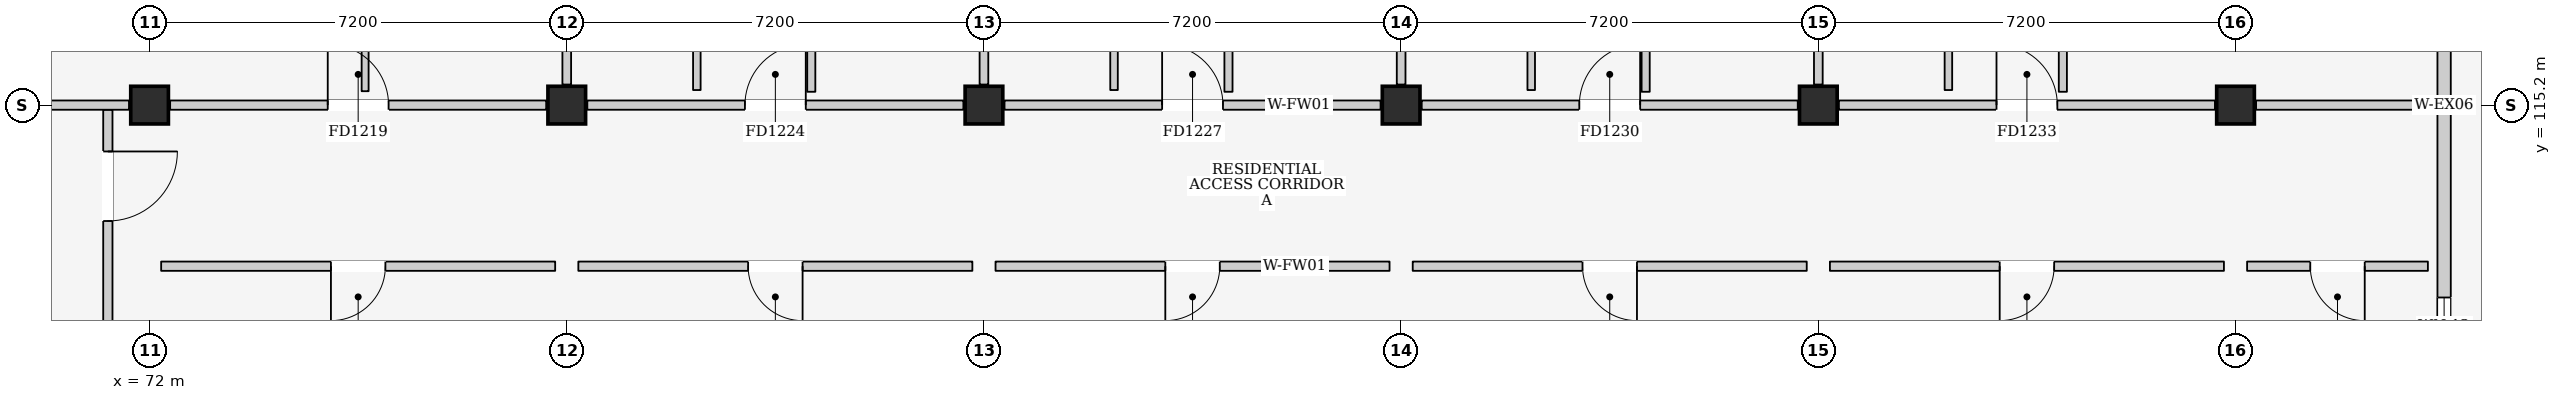
"""IFC4 building model, lengths in metres.
Left out: names, types, materials, properties, quantities, classifications, styles, units other than length and angle.
Written with IfcOpenShell. Run it as: python <this file> out.ifc"""

import sys

from ifc_helpers import new_model, si_unit, direction, frame, frame_2d, origin, origin_2d, place, context, subcontext, project, spatial, rectangle, extrude, element, fill, save


model = new_model("IFC4")
c1 = context("Model", 3, precision=1e-05, world=origin(), true_north=direction((0.0, 1.0)))
c2 = subcontext(c1, "Body", "Model", "MODEL_VIEW")
j1 = project(units=[si_unit("LENGTHUNIT", "METRE"), si_unit("PLANEANGLEUNIT", "RADIAN")], contexts=[c1])
p1 = place(None, origin())
s1 = spatial("IfcSite", under=j1, at=p1, CompositionType="ELEMENT")
p2 = place(p1, origin())
s2 = spatial("IfcBuilding", under=s1, at=p2, CompositionType="ELEMENT")
p3 = place(p2, frame((0.0, 0.0, 18.6)))
s3 = spatial("IfcBuildingStorey", under=s2, at=p3, CompositionType="ELEMENT", Elevation=18.6)
for number, where, z_axis, x_axis in (
    (1, (72.0, 115.2, 0.0), (0.0, 0.0, 1.0), (1.0, 0.0, 0.0)),
    (2, (79.2, 115.2, 0.0), (0.0, 0.0, 1.0), (1.0, 0.0, 0.0)),
    (3, (86.4, 115.2, 0.0), (0.0, 0.0, 1.0), (1.0, 0.0, 0.0)),
    (4, (93.6, 115.2, 0.0), (0.0, 0.0, 1.0), (1.0, 0.0, 0.0)),
    (5, (100.8, 115.2, 0.0), (0.0, 0.0, 1.0), (1.0, 0.0, 0.0)),
    (6, (108.0, 115.2, 0.0), (0.0, 0.0, 1.0), (1.0, 0.0, 0.0)),
):
    element("IfcColumn", number, at=place(p3, frame(where, z_axis=z_axis, x_axis=x_axis)), inside=s3, PredefinedType="COLUMN", context=c2, shape_type="SweptSolid", body=[
        extrude(rectangle(XDim=0.65, YDim=0.65, at=origin_2d()), origin(), (0.0, 0.0, 1.0), 3.3),
    ])
p4 = place(p3, frame((111.6, 108.13, 0.0), z_axis=(0.0, 0.0, 1.0), x_axis=(0.0, 1.0, 0.0)))
e7 = element("IfcWall", 7, at=p4, inside=s3, PredefinedType="ELEMENTEDWALL", context=c2, shape_type="SweptSolid", body=[
    extrude(rectangle(XDim=7.07, YDim=0.23, at=frame_2d((3.535, 0.0))), origin(), (0.0, 0.0, 1.0), 2.495),
])
p5 = place(p4, frame((2.75, 0.0, 1.1)))
e8 = element("IfcOpeningElement", 8, at=p5, cuts=e7, PredefinedType="OPENING", context=c2, shape_type="SweptSolid", body=[
    extrude(rectangle(XDim=1.0, YDim=0.9, at=frame_2d((0.5, 0.45))), frame((0.0, 0.13, 0.0), z_axis=(0.0, -1.0, 0.0), x_axis=(1.0, 0.0, 0.0)), (0.0, 0.0, 1.0), 0.26),
])
p6 = place(p3, frame((111.6, 115.2, 0.0), z_axis=(0.0, 0.0, 1.0), x_axis=(0.0, 1.0, 0.0)))
e9 = element("IfcWall", 9, at=p6, inside=s3, PredefinedType="ELEMENTEDWALL", context=c2, shape_type="SweptSolid", body=[
    extrude(rectangle(XDim=7.07, YDim=0.23, at=frame_2d((3.535, 0.0))), origin(), (0.0, 0.0, 1.0), 2.495),
])
p7 = place(p6, frame((3.6, 0.0, 0.0)))
e10 = element("IfcOpeningElement", 10, at=p7, cuts=e9, PredefinedType="OPENING", context=c2, shape_type="SweptSolid", body=[
    extrude(rectangle(XDim=1.08, YDim=2.12, at=frame_2d((0.54, 1.06))), frame((0.0, 0.13, 0.0), z_axis=(0.0, -1.0, 0.0), x_axis=(1.0, 0.0, 0.0)), (0.0, 0.0, 1.0), 0.26),
])
p8 = place(p3, frame((71.28, 110.8, 0.0), z_axis=(0.0, 0.0, 1.0), x_axis=(0.0, 1.0, 0.0)))
e11 = element("IfcWall", 11, at=p8, inside=s3, PredefinedType="PARTITIONING", context=c2, shape_type="SweptSolid", body=[
    extrude(rectangle(XDim=4.32, YDim=0.16, at=frame_2d((2.16, 0.0))), origin(), (0.0, 0.0, 1.0), 3.06),
])
p9 = place(p8, frame((2.4, 0.0, 0.0)))
e12 = element("IfcOpeningElement", 12, at=p9, cuts=e11, PredefinedType="OPENING", context=c2, shape_type="SweptSolid", body=[
    extrude(rectangle(XDim=1.2, YDim=2.2, at=frame_2d((0.6, 1.1))), frame((0.0, 0.095, 0.0), z_axis=(0.0, -1.0, 0.0), x_axis=(1.0, 0.0, 0.0)), (0.0, 0.0, 1.0), 0.19),
])
p10 = place(p3, frame((65.155, 115.2, 0.0), z_axis=(0.0, 0.0, 1.0), x_axis=(1.0, 0.0, 0.0)))
e13 = element("IfcWall", 13, at=p10, inside=s3, PredefinedType="PARTITIONING", context=c2, shape_type="SweptSolid", body=[
    extrude(rectangle(XDim=6.49, YDim=0.16, at=frame_2d((3.245, 0.0))), origin(), (0.0, 0.0, 1.0), 2.395),
])
p11 = place(p3, frame((72.355, 115.2, 0.0), z_axis=(0.0, 0.0, 1.0), x_axis=(1.0, 0.0, 0.0)))
e14 = element("IfcWall", 14, at=p11, inside=s3, PredefinedType="PARTITIONING", context=c2, shape_type="SweptSolid", body=[
    extrude(rectangle(XDim=6.49, YDim=0.16, at=frame_2d((3.245, 0.0))), origin(), (0.0, 0.0, 1.0), 2.395),
])
p12 = place(p11, frame((2.72, 0.0, 0.0)))
e15 = element("IfcOpeningElement", 15, at=p12, cuts=e14, PredefinedType="OPENING", context=c2, shape_type="SweptSolid", body=[
    extrude(rectangle(XDim=1.05, YDim=2.15, at=frame_2d((0.525, 1.075))), frame((0.0, 0.095, 0.0), z_axis=(0.0, -1.0, 0.0), x_axis=(1.0, 0.0, 0.0)), (0.0, 0.0, 1.0), 0.19),
])
p13 = place(p3, frame((79.2, 115.555, 0.0), z_axis=(0.0, 0.0, 1.0), x_axis=(0.0, 1.0, 0.0)))
e16 = element("IfcWall", 16, at=p13, inside=s3, PredefinedType="PARTITIONING", context=c2, shape_type="SweptSolid", body=[
    extrude(rectangle(XDim=6.49, YDim=0.15, at=frame_2d((3.245, 0.0))), origin(), (0.0, 0.0, 1.0), 2.545),
])
p14 = place(p3, frame((75.72, 115.44, 0.0), z_axis=(0.0, 0.0, 1.0), x_axis=(0.0, 1.0, 0.0)))
e17 = element("IfcWall", 17, at=p14, inside=s3, PredefinedType="PARTITIONING", context=c2, shape_type="SweptSolid", body=[
    extrude(rectangle(XDim=3.04, YDim=0.12, at=frame_2d((1.52, 0.0))), origin(), (0.0, 0.0, 1.0), 3.06),
])
p15 = place(p14, frame((1.04, 0.0, 0.0)))
e18 = element("IfcOpeningElement", 18, at=p15, cuts=e17, PredefinedType="OPENING", context=c2, shape_type="SweptSolid", body=[
    extrude(rectangle(XDim=0.96, YDim=2.15, at=frame_2d((0.48, 1.075))), frame((0.0, 0.075, 0.0), z_axis=(0.0, -1.0, 0.0), x_axis=(1.0, 0.0, 0.0)), (0.0, 0.0, 1.0), 0.15),
])
p16 = place(p3, frame((79.555, 115.2, 0.0), z_axis=(0.0, 0.0, 1.0), x_axis=(1.0, 0.0, 0.0)))
e19 = element("IfcWall", 19, at=p16, inside=s3, PredefinedType="PARTITIONING", context=c2, shape_type="SweptSolid", body=[
    extrude(rectangle(XDim=6.49, YDim=0.16, at=frame_2d((3.245, 0.0))), origin(), (0.0, 0.0, 1.0), 2.395),
])
p17 = place(p16, frame((2.72, 0.0, 0.0)))
e20 = element("IfcOpeningElement", 20, at=p17, cuts=e19, PredefinedType="OPENING", context=c2, shape_type="SweptSolid", body=[
    extrude(rectangle(XDim=1.05, YDim=2.15, at=frame_2d((0.525, 1.075))), frame((0.0, 0.095, 0.0), z_axis=(0.0, -1.0, 0.0), x_axis=(1.0, 0.0, 0.0)), (0.0, 0.0, 1.0), 0.19),
])
p18 = place(p3, frame((86.4, 115.555, 0.0), z_axis=(0.0, 0.0, 1.0), x_axis=(0.0, 1.0, 0.0)))
e21 = element("IfcWall", 21, at=p18, inside=s3, PredefinedType="PARTITIONING", context=c2, shape_type="SweptSolid", body=[
    extrude(rectangle(XDim=6.49, YDim=0.15, at=frame_2d((3.245, 0.0))), origin(), (0.0, 0.0, 1.0), 2.545),
])
p19 = place(p3, frame((81.445, 115.46, 0.0), z_axis=(0.0, 0.0, 1.0), x_axis=(0.0, 1.0, 0.0)))
e22 = element("IfcWall", 22, at=p19, inside=s3, PredefinedType="PARTITIONING", context=c2, shape_type="SweptSolid", body=[
    extrude(rectangle(XDim=2.13, YDim=0.13, at=frame_2d((1.065, 0.0))), origin(), (0.0, 0.0, 1.0), 3.06),
])
p20 = place(p3, frame((83.42, 115.43, 0.0), z_axis=(0.0, 0.0, 1.0), x_axis=(0.0, 1.0, 0.0)))
e23 = element("IfcWall", 23, at=p20, inside=s3, PredefinedType="PARTITIONING", context=c2, shape_type="SweptSolid", body=[
    extrude(rectangle(XDim=2.15, YDim=0.14, at=frame_2d((1.075, 0.0))), origin(), (0.0, 0.0, 1.0), 3.06),
])
p21 = place(p3, frame((86.755, 115.2, 0.0), z_axis=(0.0, 0.0, 1.0), x_axis=(1.0, 0.0, 0.0)))
e24 = element("IfcWall", 24, at=p21, inside=s3, PredefinedType="PARTITIONING", context=c2, shape_type="SweptSolid", body=[
    extrude(rectangle(XDim=6.49, YDim=0.16, at=frame_2d((3.245, 0.0))), origin(), (0.0, 0.0, 1.0), 2.395),
])
p22 = place(p21, frame((2.72, 0.0, 0.0)))
e25 = element("IfcOpeningElement", 25, at=p22, cuts=e24, PredefinedType="OPENING", context=c2, shape_type="SweptSolid", body=[
    extrude(rectangle(XDim=1.05, YDim=2.15, at=frame_2d((0.525, 1.075))), frame((0.0, 0.095, 0.0), z_axis=(0.0, -1.0, 0.0), x_axis=(1.0, 0.0, 0.0)), (0.0, 0.0, 1.0), 0.19),
])
p23 = place(p3, frame((93.6, 115.555, 0.0), z_axis=(0.0, 0.0, 1.0), x_axis=(0.0, 1.0, 0.0)))
e26 = element("IfcWall", 26, at=p23, inside=s3, PredefinedType="PARTITIONING", context=c2, shape_type="SweptSolid", body=[
    extrude(rectangle(XDim=6.49, YDim=0.15, at=frame_2d((3.245, 0.0))), origin(), (0.0, 0.0, 1.0), 2.545),
])
p24 = place(p3, frame((88.645, 115.46, 0.0), z_axis=(0.0, 0.0, 1.0), x_axis=(0.0, 1.0, 0.0)))
e27 = element("IfcWall", 27, at=p24, inside=s3, PredefinedType="PARTITIONING", context=c2, shape_type="SweptSolid", body=[
    extrude(rectangle(XDim=2.13, YDim=0.13, at=frame_2d((1.065, 0.0))), origin(), (0.0, 0.0, 1.0), 3.06),
])
p25 = place(p3, frame((90.62, 115.43, 0.0), z_axis=(0.0, 0.0, 1.0), x_axis=(0.0, 1.0, 0.0)))
e28 = element("IfcWall", 28, at=p25, inside=s3, PredefinedType="PARTITIONING", context=c2, shape_type="SweptSolid", body=[
    extrude(rectangle(XDim=2.15, YDim=0.14, at=frame_2d((1.075, 0.0))), origin(), (0.0, 0.0, 1.0), 3.06),
])
p26 = place(p3, frame((93.955, 115.2, 0.0), z_axis=(0.0, 0.0, 1.0), x_axis=(1.0, 0.0, 0.0)))
e29 = element("IfcWall", 29, at=p26, inside=s3, PredefinedType="PARTITIONING", context=c2, shape_type="SweptSolid", body=[
    extrude(rectangle(XDim=6.49, YDim=0.16, at=frame_2d((3.245, 0.0))), origin(), (0.0, 0.0, 1.0), 2.395),
])
p27 = place(p26, frame((2.72, 0.0, 0.0)))
e30 = element("IfcOpeningElement", 30, at=p27, cuts=e29, PredefinedType="OPENING", context=c2, shape_type="SweptSolid", body=[
    extrude(rectangle(XDim=1.05, YDim=2.15, at=frame_2d((0.525, 1.075))), frame((0.0, 0.095, 0.0), z_axis=(0.0, -1.0, 0.0), x_axis=(1.0, 0.0, 0.0)), (0.0, 0.0, 1.0), 0.19),
])
p28 = place(p3, frame((100.8, 115.555, 0.0), z_axis=(0.0, 0.0, 1.0), x_axis=(0.0, 1.0, 0.0)))
e31 = element("IfcWall", 31, at=p28, inside=s3, PredefinedType="PARTITIONING", context=c2, shape_type="SweptSolid", body=[
    extrude(rectangle(XDim=6.49, YDim=0.15, at=frame_2d((3.245, 0.0))), origin(), (0.0, 0.0, 1.0), 2.545),
])
p29 = place(p3, frame((95.845, 115.46, 0.0), z_axis=(0.0, 0.0, 1.0), x_axis=(0.0, 1.0, 0.0)))
e32 = element("IfcWall", 32, at=p29, inside=s3, PredefinedType="PARTITIONING", context=c2, shape_type="SweptSolid", body=[
    extrude(rectangle(XDim=2.13, YDim=0.13, at=frame_2d((1.065, 0.0))), origin(), (0.0, 0.0, 1.0), 3.06),
])
p30 = place(p3, frame((97.82, 115.43, 0.0), z_axis=(0.0, 0.0, 1.0), x_axis=(0.0, 1.0, 0.0)))
e33 = element("IfcWall", 33, at=p30, inside=s3, PredefinedType="PARTITIONING", context=c2, shape_type="SweptSolid", body=[
    extrude(rectangle(XDim=2.15, YDim=0.14, at=frame_2d((1.075, 0.0))), origin(), (0.0, 0.0, 1.0), 3.06),
])
p31 = place(p3, frame((101.155, 115.2, 0.0), z_axis=(0.0, 0.0, 1.0), x_axis=(1.0, 0.0, 0.0)))
e34 = element("IfcWall", 34, at=p31, inside=s3, PredefinedType="PARTITIONING", context=c2, shape_type="SweptSolid", body=[
    extrude(rectangle(XDim=6.49, YDim=0.16, at=frame_2d((3.245, 0.0))), origin(), (0.0, 0.0, 1.0), 2.395),
])
p32 = place(p31, frame((2.72, 0.0, 0.0)))
e35 = element("IfcOpeningElement", 35, at=p32, cuts=e34, PredefinedType="OPENING", context=c2, shape_type="SweptSolid", body=[
    extrude(rectangle(XDim=1.05, YDim=2.15, at=frame_2d((0.525, 1.075))), frame((0.0, 0.095, 0.0), z_axis=(0.0, -1.0, 0.0), x_axis=(1.0, 0.0, 0.0)), (0.0, 0.0, 1.0), 0.19),
])
p33 = place(p3, frame((108.355, 115.2, 0.0), z_axis=(0.0, 0.0, 1.0), x_axis=(1.0, 0.0, 0.0)))
e36 = element("IfcWall", 36, at=p33, inside=s3, PredefinedType="PARTITIONING", context=c2, shape_type="SweptSolid", body=[
    extrude(rectangle(XDim=2.965, YDim=0.16, at=frame_2d((1.482, 0.0))), origin(), (0.0, 0.0, 1.0), 2.395),
])
p34 = place(p3, frame((103.045, 115.46, 0.0), z_axis=(0.0, 0.0, 1.0), x_axis=(0.0, 1.0, 0.0)))
e37 = element("IfcWall", 37, at=p34, inside=s3, PredefinedType="PARTITIONING", context=c2, shape_type="SweptSolid", body=[
    extrude(rectangle(XDim=2.13, YDim=0.13, at=frame_2d((1.065, 0.0))), origin(), (0.0, 0.0, 1.0), 3.06),
])
p35 = place(p3, frame((105.02, 115.43, 0.0), z_axis=(0.0, 0.0, 1.0), x_axis=(0.0, 1.0, 0.0)))
e38 = element("IfcWall", 38, at=p35, inside=s3, PredefinedType="PARTITIONING", context=c2, shape_type="SweptSolid", body=[
    extrude(rectangle(XDim=2.15, YDim=0.14, at=frame_2d((1.075, 0.0))), origin(), (0.0, 0.0, 1.0), 3.06),
])
p36 = place(p3, frame((72.2, 112.42, 0.0), z_axis=(0.0, 0.0, 1.0), x_axis=(1.0, 0.0, 0.0)))
e39 = element("IfcWall", 39, at=p36, inside=s3, PredefinedType="PARTITIONING", context=c2, shape_type="SweptSolid", body=[
    extrude(rectangle(XDim=6.8, YDim=0.16, at=frame_2d((3.4, 0.0))), origin(), (0.0, 0.0, 1.0), 3.06),
])
p37 = place(p36, frame((2.93, 0.0, 0.0)))
e40 = element("IfcOpeningElement", 40, at=p37, cuts=e39, PredefinedType="OPENING", context=c2, shape_type="SweptSolid", body=[
    extrude(rectangle(XDim=0.94, YDim=2.12, at=frame_2d((0.47, 1.06))), frame((0.0, 0.095, 0.0), z_axis=(0.0, -1.0, 0.0), x_axis=(1.0, 0.0, 0.0)), (0.0, 0.0, 1.0), 0.19),
])
p38 = place(p3, frame((79.4, 112.42, 0.0), z_axis=(0.0, 0.0, 1.0), x_axis=(1.0, 0.0, 0.0)))
e41 = element("IfcWall", 41, at=p38, inside=s3, PredefinedType="PARTITIONING", context=c2, shape_type="SweptSolid", body=[
    extrude(rectangle(XDim=6.8, YDim=0.16, at=frame_2d((3.4, 0.0))), origin(), (0.0, 0.0, 1.0), 3.06),
])
p39 = place(p38, frame((2.93, 0.0, 0.0)))
e42 = element("IfcOpeningElement", 42, at=p39, cuts=e41, PredefinedType="OPENING", context=c2, shape_type="SweptSolid", body=[
    extrude(rectangle(XDim=0.94, YDim=2.12, at=frame_2d((0.47, 1.06))), frame((0.0, 0.095, 0.0), z_axis=(0.0, -1.0, 0.0), x_axis=(1.0, 0.0, 0.0)), (0.0, 0.0, 1.0), 0.19),
])
p40 = place(p3, frame((86.6, 112.42, 0.0), z_axis=(0.0, 0.0, 1.0), x_axis=(1.0, 0.0, 0.0)))
e43 = element("IfcWall", 43, at=p40, inside=s3, PredefinedType="PARTITIONING", context=c2, shape_type="SweptSolid", body=[
    extrude(rectangle(XDim=6.8, YDim=0.16, at=frame_2d((3.4, 0.0))), origin(), (0.0, 0.0, 1.0), 3.06),
])
p41 = place(p40, frame((2.93, 0.0, 0.0)))
e44 = element("IfcOpeningElement", 44, at=p41, cuts=e43, PredefinedType="OPENING", context=c2, shape_type="SweptSolid", body=[
    extrude(rectangle(XDim=0.94, YDim=2.12, at=frame_2d((0.47, 1.06))), frame((0.0, 0.095, 0.0), z_axis=(0.0, -1.0, 0.0), x_axis=(1.0, 0.0, 0.0)), (0.0, 0.0, 1.0), 0.19),
])
p42 = place(p3, frame((93.8, 112.42, 0.0), z_axis=(0.0, 0.0, 1.0), x_axis=(1.0, 0.0, 0.0)))
e45 = element("IfcWall", 45, at=p42, inside=s3, PredefinedType="PARTITIONING", context=c2, shape_type="SweptSolid", body=[
    extrude(rectangle(XDim=6.8, YDim=0.16, at=frame_2d((3.4, 0.0))), origin(), (0.0, 0.0, 1.0), 3.06),
])
p43 = place(p42, frame((2.93, 0.0, 0.0)))
e46 = element("IfcOpeningElement", 46, at=p43, cuts=e45, PredefinedType="OPENING", context=c2, shape_type="SweptSolid", body=[
    extrude(rectangle(XDim=0.94, YDim=2.12, at=frame_2d((0.47, 1.06))), frame((0.0, 0.095, 0.0), z_axis=(0.0, -1.0, 0.0), x_axis=(1.0, 0.0, 0.0)), (0.0, 0.0, 1.0), 0.19),
])
p44 = place(p3, frame((101.0, 112.42, 0.0), z_axis=(0.0, 0.0, 1.0), x_axis=(1.0, 0.0, 0.0)))
e47 = element("IfcWall", 47, at=p44, inside=s3, PredefinedType="PARTITIONING", context=c2, shape_type="SweptSolid", body=[
    extrude(rectangle(XDim=6.8, YDim=0.16, at=frame_2d((3.4, 0.0))), origin(), (0.0, 0.0, 1.0), 3.06),
])
p45 = place(p44, frame((2.93, 0.0, 0.0)))
e48 = element("IfcOpeningElement", 48, at=p45, cuts=e47, PredefinedType="OPENING", context=c2, shape_type="SweptSolid", body=[
    extrude(rectangle(XDim=0.94, YDim=2.12, at=frame_2d((0.47, 1.06))), frame((0.0, 0.095, 0.0), z_axis=(0.0, -1.0, 0.0), x_axis=(1.0, 0.0, 0.0)), (0.0, 0.0, 1.0), 0.19),
])
p46 = place(p3, frame((108.2, 112.42, 0.0), z_axis=(0.0, 0.0, 1.0), x_axis=(1.0, 0.0, 0.0)))
e49 = element("IfcWall", 49, at=p46, inside=s3, PredefinedType="PARTITIONING", context=c2, shape_type="SweptSolid", body=[
    extrude(rectangle(XDim=3.12, YDim=0.16, at=frame_2d((1.56, 0.0))), origin(), (0.0, 0.0, 1.0), 3.06),
])
p47 = place(p46, frame((1.09, 0.0, 0.0)))
e50 = element("IfcOpeningElement", 50, at=p47, cuts=e49, PredefinedType="OPENING", context=c2, shape_type="SweptSolid", body=[
    extrude(rectangle(XDim=0.94, YDim=2.12, at=frame_2d((0.47, 1.06))), frame((0.0, 0.095, 0.0), z_axis=(0.0, -1.0, 0.0), x_axis=(1.0, 0.0, 0.0)), (0.0, 0.0, 1.0), 0.19),
])
p48 = place(p5, origin())
e51 = element("IfcWindow", 51, at=p48, inside=s3, PartitioningType="SINGLE_PANEL", PredefinedType="WINDOW", context=c2, shape_type="SweptSolid", body=[
    extrude(rectangle(XDim=1.0, YDim=0.9, at=frame_2d((0.5, 0.45))), frame((0.0, 0.03, 0.0), z_axis=(0.0, -1.0, 0.0), x_axis=(1.0, 0.0, 0.0)), (0.0, 0.0, 1.0), 0.06),
])
fill(e8, e51)
p49 = place(p9, frame((1.2, 0.0, 0.0), z_axis=(0.0, 0.0, 1.0), x_axis=(-1.0, 0.0, 0.0)))
e52 = element("IfcDoor", 52, at=p49, inside=s3, OperationType="SINGLE_SWING_LEFT", PredefinedType="DOOR", context=c2, shape_type="SweptSolid", body=[
    extrude(rectangle(XDim=1.2, YDim=2.2, at=frame_2d((0.6, 1.1))), frame((0.0, 0.025, 0.0), z_axis=(0.0, -1.0, 0.0), x_axis=(1.0, 0.0, 0.0)), (0.0, 0.0, 1.0), 0.05),
])
fill(e12, e52)
p50 = place(p12, origin())
e53 = element("IfcDoor", 53, at=p50, inside=s3, OperationType="SINGLE_SWING_LEFT", PredefinedType="DOOR", context=c2, shape_type="SweptSolid", body=[
    extrude(rectangle(XDim=1.05, YDim=2.15, at=frame_2d((0.525, 1.075))), frame((0.0, 0.025, 0.0), z_axis=(0.0, -1.0, 0.0), x_axis=(1.0, 0.0, 0.0)), (0.0, 0.0, 1.0), 0.05),
])
fill(e15, e53)
p51 = place(p17, origin())
e54 = element("IfcDoor", 54, at=p51, inside=s3, OperationType="SINGLE_SWING_RIGHT", PredefinedType="DOOR", context=c2, shape_type="SweptSolid", body=[
    extrude(rectangle(XDim=1.05, YDim=2.15, at=frame_2d((0.525, 1.075))), frame((0.0, 0.025, 0.0), z_axis=(0.0, -1.0, 0.0), x_axis=(1.0, 0.0, 0.0)), (0.0, 0.0, 1.0), 0.05),
])
fill(e20, e54)
p52 = place(p22, origin())
e55 = element("IfcDoor", 55, at=p52, inside=s3, OperationType="SINGLE_SWING_LEFT", PredefinedType="DOOR", context=c2, shape_type="SweptSolid", body=[
    extrude(rectangle(XDim=1.05, YDim=2.15, at=frame_2d((0.525, 1.075))), frame((0.0, 0.025, 0.0), z_axis=(0.0, -1.0, 0.0), x_axis=(1.0, 0.0, 0.0)), (0.0, 0.0, 1.0), 0.05),
])
fill(e25, e55)
p53 = place(p27, origin())
e56 = element("IfcDoor", 56, at=p53, inside=s3, OperationType="SINGLE_SWING_RIGHT", PredefinedType="DOOR", context=c2, shape_type="SweptSolid", body=[
    extrude(rectangle(XDim=1.05, YDim=2.15, at=frame_2d((0.525, 1.075))), frame((0.0, 0.025, 0.0), z_axis=(0.0, -1.0, 0.0), x_axis=(1.0, 0.0, 0.0)), (0.0, 0.0, 1.0), 0.05),
])
fill(e30, e56)
p54 = place(p32, origin())
e57 = element("IfcDoor", 57, at=p54, inside=s3, OperationType="SINGLE_SWING_LEFT", PredefinedType="DOOR", context=c2, shape_type="SweptSolid", body=[
    extrude(rectangle(XDim=1.05, YDim=2.15, at=frame_2d((0.525, 1.075))), frame((0.0, 0.025, 0.0), z_axis=(0.0, -1.0, 0.0), x_axis=(1.0, 0.0, 0.0)), (0.0, 0.0, 1.0), 0.05),
])
fill(e35, e57)
p55 = place(p37, frame((0.94, 0.0, 0.0), z_axis=(0.0, 0.0, 1.0), x_axis=(-1.0, 0.0, 0.0)))
e58 = element("IfcDoor", 58, at=p55, inside=s3, OperationType="SINGLE_SWING_RIGHT", PredefinedType="DOOR", context=c2, shape_type="SweptSolid", body=[
    extrude(rectangle(XDim=0.94, YDim=2.12, at=frame_2d((0.47, 1.06))), frame((0.0, 0.025, 0.0), z_axis=(0.0, -1.0, 0.0), x_axis=(1.0, 0.0, 0.0)), (0.0, 0.0, 1.0), 0.05),
])
fill(e40, e58)
p56 = place(p39, frame((0.94, 0.0, 0.0), z_axis=(0.0, 0.0, 1.0), x_axis=(-1.0, 0.0, 0.0)))
e59 = element("IfcDoor", 59, at=p56, inside=s3, OperationType="SINGLE_SWING_LEFT", PredefinedType="DOOR", context=c2, shape_type="SweptSolid", body=[
    extrude(rectangle(XDim=0.94, YDim=2.12, at=frame_2d((0.47, 1.06))), frame((0.0, 0.025, 0.0), z_axis=(0.0, -1.0, 0.0), x_axis=(1.0, 0.0, 0.0)), (0.0, 0.0, 1.0), 0.05),
])
fill(e42, e59)
p57 = place(p41, frame((0.94, 0.0, 0.0), z_axis=(0.0, 0.0, 1.0), x_axis=(-1.0, 0.0, 0.0)))
e60 = element("IfcDoor", 60, at=p57, inside=s3, OperationType="SINGLE_SWING_RIGHT", PredefinedType="DOOR", context=c2, shape_type="SweptSolid", body=[
    extrude(rectangle(XDim=0.94, YDim=2.12, at=frame_2d((0.47, 1.06))), frame((0.0, 0.025, 0.0), z_axis=(0.0, -1.0, 0.0), x_axis=(1.0, 0.0, 0.0)), (0.0, 0.0, 1.0), 0.05),
])
fill(e44, e60)
p58 = place(p43, frame((0.94, 0.0, 0.0), z_axis=(0.0, 0.0, 1.0), x_axis=(-1.0, 0.0, 0.0)))
e61 = element("IfcDoor", 61, at=p58, inside=s3, OperationType="SINGLE_SWING_LEFT", PredefinedType="DOOR", context=c2, shape_type="SweptSolid", body=[
    extrude(rectangle(XDim=0.94, YDim=2.12, at=frame_2d((0.47, 1.06))), frame((0.0, 0.025, 0.0), z_axis=(0.0, -1.0, 0.0), x_axis=(1.0, 0.0, 0.0)), (0.0, 0.0, 1.0), 0.05),
])
fill(e46, e61)
p59 = place(p45, frame((0.94, 0.0, 0.0), z_axis=(0.0, 0.0, 1.0), x_axis=(-1.0, 0.0, 0.0)))
e62 = element("IfcDoor", 62, at=p59, inside=s3, OperationType="SINGLE_SWING_RIGHT", PredefinedType="DOOR", context=c2, shape_type="SweptSolid", body=[
    extrude(rectangle(XDim=0.94, YDim=2.12, at=frame_2d((0.47, 1.06))), frame((0.0, 0.025, 0.0), z_axis=(0.0, -1.0, 0.0), x_axis=(1.0, 0.0, 0.0)), (0.0, 0.0, 1.0), 0.05),
])
fill(e48, e62)
p60 = place(p47, frame((0.94, 0.0, 0.0), z_axis=(0.0, 0.0, 1.0), x_axis=(-1.0, 0.0, 0.0)))
e63 = element("IfcDoor", 63, at=p60, inside=s3, OperationType="SINGLE_SWING_LEFT", PredefinedType="DOOR", context=c2, shape_type="SweptSolid", body=[
    extrude(rectangle(XDim=0.94, YDim=2.12, at=frame_2d((0.47, 1.06))), frame((0.0, 0.025, 0.0), z_axis=(0.0, -1.0, 0.0), x_axis=(1.0, 0.0, 0.0)), (0.0, 0.0, 1.0), 0.05),
])
fill(e50, e63)
save(model, sys.argv[1])
